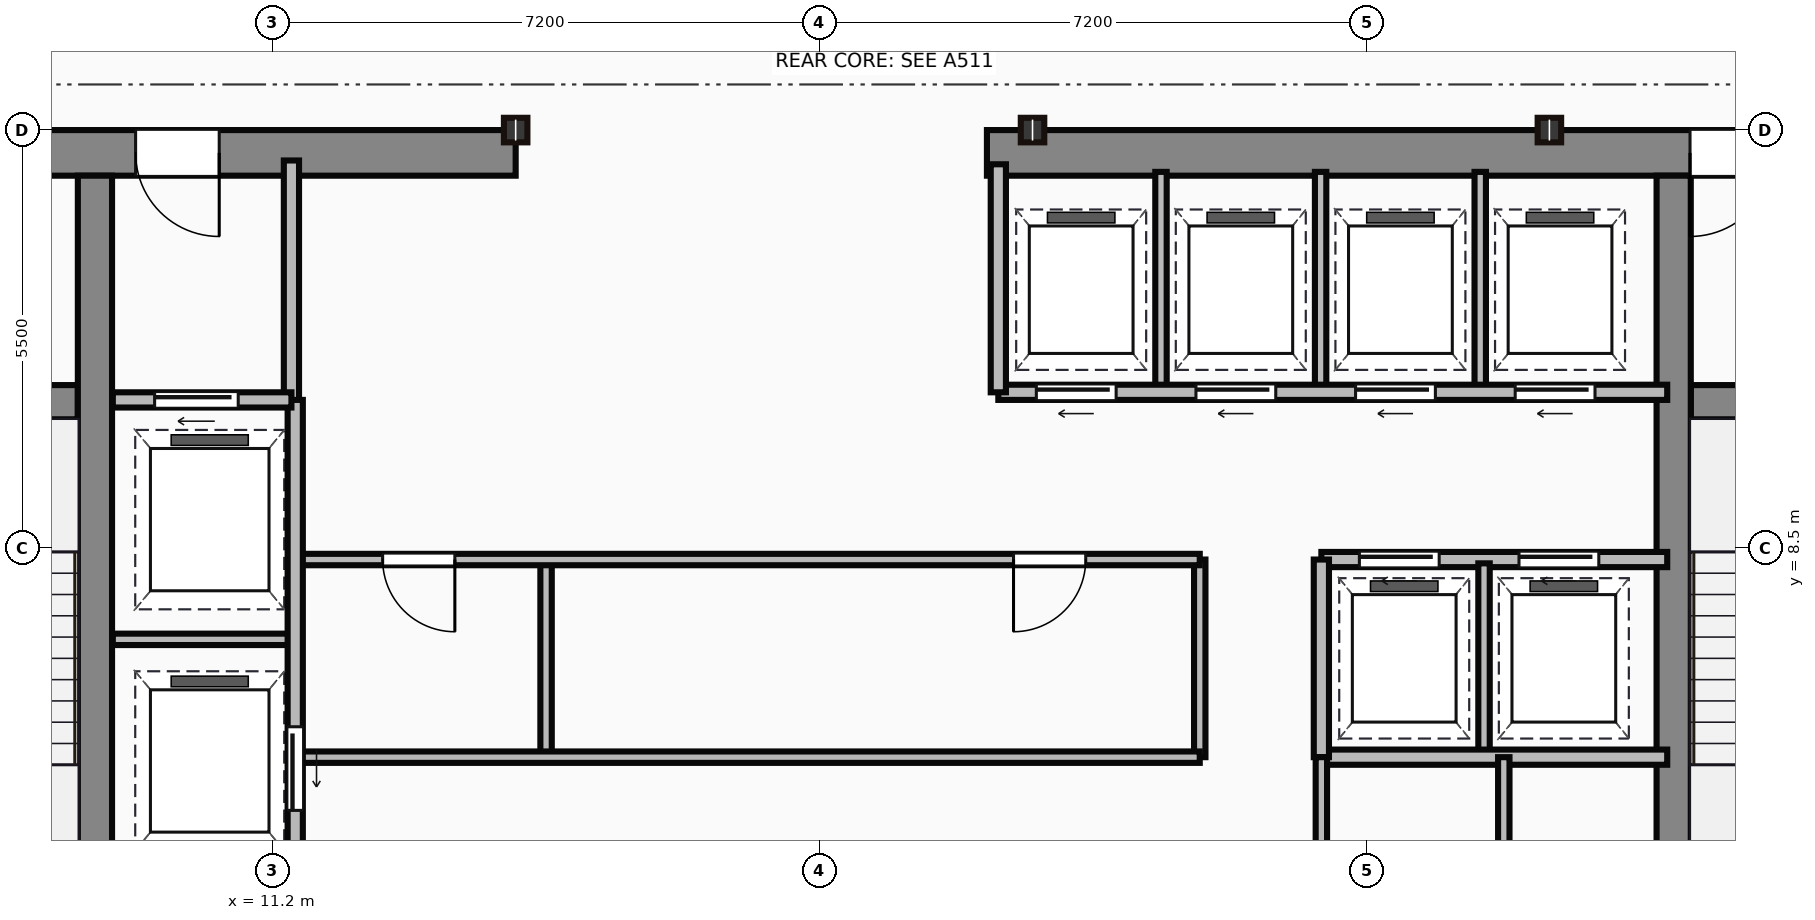
"""IFC4 building model, lengths in metres.
Left out: names, types, materials, properties, quantities, classifications, styles, units other than length and angle.
Written with IfcOpenShell. Run it as: python <this file> out.ifc"""

import sys

from ifc_helpers import new_model, si_unit, direction, frame, frame_2d, origin, origin_2d, place, context, subcontext, project, spatial, rectangle, i_section, extrude, source, transform, mapped, element, fill, save


model = new_model("IFC4")
c1 = context("Model", 3, precision=1e-05, world=origin(), true_north=direction((0.0, 1.0)))
c2 = subcontext(c1, "Body", "Model", "MODEL_VIEW")
j1 = project(units=[si_unit("LENGTHUNIT", "METRE"), si_unit("PLANEANGLEUNIT", "RADIAN")], contexts=[c1])
p1 = place(None, origin())
s1 = spatial("IfcSite", under=j1, at=p1, CompositionType="ELEMENT")
p2 = place(p1, origin())
s2 = spatial("IfcBuilding", under=s1, at=p2, CompositionType="ELEMENT")
p3 = place(p2, frame((0.0, 0.0, 255.15)))
s3 = spatial("IfcBuildingStorey", under=s2, at=p3, CompositionType="ELEMENT", Elevation=255.15)
m1 = source(origin(), c2, "Body", "SweptSolid", [
    extrude(rectangle(XDim=9.1, YDim=0.6, at=frame_2d((4.55, 0.0))), origin(), (0.0, 0.0, 1.0), 3.65),
])
p4 = place(p3, frame((5.3, 13.7, 0.0), z_axis=(0.0, 0.0, 1.0), x_axis=(1.0, 0.0, 0.0)))
e1 = element("IfcWall", 1, at=p4, inside=s3, PredefinedType="SHEAR", context=c2, shape_type="MappedRepresentation", body=[
    mapped(m1, transform((0.0, 0.0, 0.0))),
])
p5 = place(p4, frame((4.1, 0.0, 0.0)))
e2 = element("IfcOpeningElement", 2, at=p5, cuts=e1, PredefinedType="OPENING", context=c2, shape_type="SweptSolid", body=[
    extrude(rectangle(XDim=1.1, YDim=2.15, at=frame_2d((0.55, 1.075))), frame((0.0, 0.31, 0.0), z_axis=(0.0, -1.0, 0.0), x_axis=(1.0, 0.0, 0.0)), (0.0, 0.0, 1.0), 0.62),
])
m2 = source(origin(), c2, "Body", "SweptSolid", [
    extrude(rectangle(XDim=12.6, YDim=0.6, at=frame_2d((6.3, 0.0))), origin(), (0.0, 0.0, 1.0), 3.65),
])
p6 = place(p3, frame((20.6, 13.7, 0.0), z_axis=(0.0, 0.0, 1.0), x_axis=(1.0, 0.0, 0.0)))
e3 = element("IfcWall", 3, at=p6, inside=s3, PredefinedType="SHEAR", context=c2, shape_type="MappedRepresentation", body=[
    mapped(m2, transform((0.0, 0.0, 0.0))),
])
p7 = place(p6, frame((9.25, 0.0, 0.0)))
e4 = element("IfcOpeningElement", 4, at=p7, cuts=e3, PredefinedType="OPENING", context=c2, shape_type="SweptSolid", body=[
    extrude(rectangle(XDim=1.1, YDim=2.15, at=frame_2d((0.55, 1.075))), frame((0.0, 0.31, 0.0), z_axis=(0.0, -1.0, 0.0), x_axis=(1.0, 0.0, 0.0)), (0.0, 0.0, 1.0), 0.62),
])
m3 = source(origin(), c2, "Body", "SweptSolid", [
    extrude(rectangle(XDim=12.5, YDim=0.45, at=frame_2d((6.25, 0.0))), origin(), (0.0, 0.0, 1.0), 3.65),
])
for number, where, z_axis, x_axis in (
    (5, (8.865, 0.9, 0.0), (0.0, 0.0, 1.0), (0.0, 1.0, 0.0)),
    (6, (29.635, 0.9, 0.0), (0.0, 0.0, 1.0), (0.0, 1.0, 0.0)),
):
    element("IfcWall", number, at=place(p3, frame(where, z_axis=z_axis, x_axis=x_axis)), inside=s3, PredefinedType="SHEAR", context=c2, shape_type="MappedRepresentation", body=[
        mapped(m3, transform((0.0, 0.0, 0.0))),
    ])
m4 = source(origin(), c2, "Body", "SweptSolid", [
    extrude(rectangle(XDim=3.39, YDim=0.45, at=frame_2d((1.695, 0.0))), origin(), (0.0, 0.0, 1.0), 3.65),
])
p8 = place(p3, frame((5.25, 10.42, 0.0), z_axis=(0.0, 0.0, 1.0), x_axis=(1.0, 0.0, 0.0)))
e7 = element("IfcWall", 7, at=p8, inside=s3, PredefinedType="SHEAR", context=c2, shape_type="MappedRepresentation", body=[
    mapped(m4, transform((0.0, 0.0, 0.0))),
])
p9 = place(p8, frame((1.05, 0.0, 0.0)))
e8 = element("IfcOpeningElement", 8, at=p9, cuts=e7, PredefinedType="OPENING", context=c2, shape_type="SweptSolid", body=[
    extrude(rectangle(XDim=1.1, YDim=2.15, at=frame_2d((0.55, 1.075))), frame((0.0, 0.235, 0.0), z_axis=(0.0, -1.0, 0.0), x_axis=(1.0, 0.0, 0.0)), (0.0, 0.0, 1.0), 0.47),
])
p10 = place(p3, frame((29.86, 10.42, 0.0), z_axis=(0.0, 0.0, 1.0), x_axis=(1.0, 0.0, 0.0)))
e9 = element("IfcWall", 9, at=p10, inside=s3, PredefinedType="SHEAR", context=c2, shape_type="MappedRepresentation", body=[
    mapped(m4, transform((0.0, 0.0, 0.0))),
])
p11 = place(p10, frame((1.1, 0.0, 0.0)))
e10 = element("IfcOpeningElement", 10, at=p11, cuts=e9, PredefinedType="OPENING", context=c2, shape_type="SweptSolid", body=[
    extrude(rectangle(XDim=1.1, YDim=2.15, at=frame_2d((0.55, 1.075))), frame((0.0, 0.235, 0.0), z_axis=(0.0, -1.0, 0.0), x_axis=(1.0, 0.0, 0.0)), (0.0, 0.0, 1.0), 0.47),
])
m5 = source(origin(), c2, "Body", "SweptSolid", [
    extrude(i_section(OverallWidth=0.309, OverallDepth=0.323, WebThickness=0.014, FlangeThickness=0.023, at=origin_2d()), origin(), (0.0, 0.0, 1.0), 3.65),
])
for number, where, z_axis, x_axis in (
    (11, (14.4, 14.0, 0.0), (0.0, 0.0, 1.0), (1.0, 0.0, 0.0)),
    (12, (21.2, 14.0, 0.0), (0.0, 0.0, 1.0), (1.0, 0.0, 0.0)),
    (13, (28.0, 14.0, 0.0), (0.0, 0.0, 1.0), (1.0, 0.0, 0.0)),
):
    element("IfcColumn", number, at=place(p3, frame(where, z_axis=z_axis, x_axis=x_axis)), inside=s3, PredefinedType="COLUMN", context=c2, shape_type="MappedRepresentation", body=[
        mapped(m5, transform((0.0, 0.0, 0.0))),
    ])
m6 = source(origin(), c2, "Body", "SweptSolid", [
    extrude(rectangle(XDim=3.18, YDim=0.2, at=frame_2d((1.59, 0.0))), origin(), (0.0, 0.0, 1.0), 3.4),
])
p12 = place(p3, frame((11.45, 10.42, 0.0), z_axis=(0.0, 0.0, 1.0), x_axis=(0.0, 1.0, 0.0)))
e14 = element("IfcWall", 14, at=p12, inside=s3, PredefinedType="PARTITIONING", context=c2, shape_type="MappedRepresentation", body=[
    mapped(m6, transform((0.0, 0.0, 0.0))),
])
m7 = source(origin(), c2, "Body", "SweptSolid", [
    extrude(rectangle(XDim=2.35, YDim=0.2, at=frame_2d((1.175, 0.0))), origin(), (0.0, 0.0, 1.0), 3.4),
])
p13 = place(p3, frame((9.1, 10.45, 0.0), z_axis=(0.0, 0.0, 1.0), x_axis=(1.0, 0.0, 0.0)))
e15 = element("IfcWall", 15, at=p13, inside=s3, PredefinedType="PARTITIONING", context=c2, shape_type="MappedRepresentation", body=[
    mapped(m7, transform((0.0, 0.0, 0.0))),
])
p14 = place(p13, frame((0.55, 0.0, 0.0)))
e16 = element("IfcOpeningElement", 16, at=p14, cuts=e15, PredefinedType="OPENING", context=c2, shape_type="SweptSolid", body=[
    extrude(rectangle(XDim=1.1, YDim=2.15, at=frame_2d((0.55, 1.075))), frame((0.0, 0.11, 0.0), z_axis=(0.0, -1.0, 0.0), x_axis=(1.0, 0.0, 0.0)), (0.0, 0.0, 1.0), 0.22),
])
m8 = source(origin(), c2, "Body", "SweptSolid", [
    extrude(rectangle(XDim=9.6, YDim=0.2, at=frame_2d((4.8, 0.0))), origin(), (0.0, 0.0, 1.0), 3.4),
])
p15 = place(p3, frame((11.5, 0.85, 0.0), z_axis=(0.0, 0.0, 1.0), x_axis=(0.0, 1.0, 0.0)))
e17 = element("IfcWall", 17, at=p15, inside=s3, PredefinedType="PARTITIONING", context=c2, shape_type="MappedRepresentation", body=[
    mapped(m8, transform((0.0, 0.0, 0.0))),
])
p16 = place(p15, frame((4.2, 0.0, 0.0)))
e18 = element("IfcOpeningElement", 18, at=p16, cuts=e17, PredefinedType="OPENING", context=c2, shape_type="SweptSolid", body=[
    extrude(rectangle(XDim=1.1, YDim=2.15, at=frame_2d((0.55, 1.075))), frame((0.0, 0.11, 0.0), z_axis=(0.0, -1.0, 0.0), x_axis=(1.0, 0.0, 0.0)), (0.0, 0.0, 1.0), 0.22),
])
p17 = place(p15, frame((0.9, 0.0, 0.0)))
e19 = element("IfcOpeningElement", 19, at=p17, cuts=e17, PredefinedType="OPENING", context=c2, shape_type="SweptSolid", body=[
    extrude(rectangle(XDim=1.2, YDim=2.15, at=frame_2d((0.6, 1.075))), frame((0.0, 0.11, 0.0), z_axis=(0.0, -1.0, 0.0), x_axis=(1.0, 0.0, 0.0)), (0.0, 0.0, 1.0), 0.22),
])
m9 = source(origin(), c2, "Body", "SweptSolid", [
    extrude(rectangle(XDim=2.4, YDim=0.15, at=frame_2d((1.2, 0.0))), origin(), (0.0, 0.0, 1.0), 3.4),
])
p18 = place(p3, frame((9.1, 7.3, 0.0), z_axis=(0.0, 0.0, 1.0), x_axis=(1.0, 0.0, 0.0)))
e20 = element("IfcWall", 20, at=p18, inside=s3, PredefinedType="PARTITIONING", context=c2, shape_type="MappedRepresentation", body=[
    mapped(m9, transform((0.0, 0.0, 0.0))),
])
m10 = source(origin(), c2, "Body", "SweptSolid", [
    extrude(rectangle(XDim=11.85, YDim=0.15, at=frame_2d((5.925, 0.0))), origin(), (0.0, 0.0, 1.0), 3.4),
])
p19 = place(p3, frame((11.55, 5.75, 0.0), z_axis=(0.0, 0.0, 1.0), x_axis=(1.0, 0.0, 0.0)))
e21 = element("IfcWall", 21, at=p19, inside=s3, PredefinedType="PARTITIONING", context=c2, shape_type="MappedRepresentation", body=[
    mapped(m10, transform((0.0, 0.0, 0.0))),
])
p20 = place(p3, frame((11.55, 8.35, 0.0), z_axis=(0.0, 0.0, 1.0), x_axis=(1.0, 0.0, 0.0)))
e22 = element("IfcWall", 22, at=p20, inside=s3, PredefinedType="PARTITIONING", context=c2, shape_type="MappedRepresentation", body=[
    mapped(m10, transform((0.0, 0.0, 0.0))),
])
p21 = place(p20, frame((1.1, 0.0, 0.0)))
e23 = element("IfcOpeningElement", 23, at=p21, cuts=e22, PredefinedType="OPENING", context=c2, shape_type="SweptSolid", body=[
    extrude(rectangle(XDim=0.95, YDim=2.15, at=frame_2d((0.475, 1.075))), frame((0.0, 0.085, 0.0), z_axis=(0.0, -1.0, 0.0), x_axis=(1.0, 0.0, 0.0)), (0.0, 0.0, 1.0), 0.17),
])
p22 = place(p20, frame((9.4, 0.0, 0.0)))
e24 = element("IfcOpeningElement", 24, at=p22, cuts=e22, PredefinedType="OPENING", context=c2, shape_type="SweptSolid", body=[
    extrude(rectangle(XDim=0.95, YDim=2.15, at=frame_2d((0.475, 1.075))), frame((0.0, 0.085, 0.0), z_axis=(0.0, -1.0, 0.0), x_axis=(1.0, 0.0, 0.0)), (0.0, 0.0, 1.0), 0.17),
])
m11 = source(origin(), c2, "Body", "SweptSolid", [
    extrude(rectangle(XDim=2.6, YDim=0.15, at=frame_2d((1.3, 0.0))), origin(), (0.0, 0.0, 1.0), 3.4),
])
p23 = place(p3, frame((23.4, 5.75, 0.0), z_axis=(0.0, 0.0, 1.0), x_axis=(0.0, 1.0, 0.0)))
e25 = element("IfcWall", 25, at=p23, inside=s3, PredefinedType="PARTITIONING", context=c2, shape_type="MappedRepresentation", body=[
    mapped(m11, transform((0.0, 0.0, 0.0))),
])
m12 = source(origin(), c2, "Body", "SweptSolid", [
    extrude(rectangle(XDim=2.5, YDim=0.15, at=frame_2d((1.25, 0.0))), origin(), (0.0, 0.0, 1.0), 3.4),
])
p24 = place(p3, frame((14.8, 5.8, 0.0), z_axis=(0.0, 0.0, 1.0), x_axis=(0.0, 1.0, 0.0)))
e26 = element("IfcWall", 26, at=p24, inside=s3, PredefinedType="PARTITIONING", context=c2, shape_type="MappedRepresentation", body=[
    mapped(m12, transform((0.0, 0.0, 0.0))),
])
m13 = source(origin(), c2, "Body", "SweptSolid", [
    extrude(rectangle(XDim=8.8, YDim=0.2, at=frame_2d((4.4, 0.0))), origin(), (0.0, 0.0, 1.0), 3.4),
])
p25 = place(p3, frame((20.75, 10.55, 0.0), z_axis=(0.0, 0.0, 1.0), x_axis=(1.0, 0.0, 0.0)))
e27 = element("IfcWall", 27, at=p25, inside=s3, PredefinedType="PARTITIONING", context=c2, shape_type="MappedRepresentation", body=[
    mapped(m13, transform((0.0, 0.0, 0.0))),
])
p26 = place(p25, frame((0.5, 0.0, 0.0)))
e28 = element("IfcOpeningElement", 28, at=p26, cuts=e27, PredefinedType="OPENING", context=c2, shape_type="SweptSolid", body=[
    extrude(rectangle(XDim=1.05, YDim=2.15, at=frame_2d((0.525, 1.075))), frame((0.0, 0.11, 0.0), z_axis=(0.0, -1.0, 0.0), x_axis=(1.0, 0.0, 0.0)), (0.0, 0.0, 1.0), 0.22),
])
p27 = place(p25, frame((2.6, 0.0, 0.0)))
e29 = element("IfcOpeningElement", 29, at=p27, cuts=e27, PredefinedType="OPENING", context=c2, shape_type="SweptSolid", body=[
    extrude(rectangle(XDim=1.05, YDim=2.15, at=frame_2d((0.525, 1.075))), frame((0.0, 0.11, 0.0), z_axis=(0.0, -1.0, 0.0), x_axis=(1.0, 0.0, 0.0)), (0.0, 0.0, 1.0), 0.22),
])
p28 = place(p25, frame((4.7, 0.0, 0.0)))
e30 = element("IfcOpeningElement", 30, at=p28, cuts=e27, PredefinedType="OPENING", context=c2, shape_type="SweptSolid", body=[
    extrude(rectangle(XDim=1.05, YDim=2.15, at=frame_2d((0.525, 1.075))), frame((0.0, 0.11, 0.0), z_axis=(0.0, -1.0, 0.0), x_axis=(1.0, 0.0, 0.0)), (0.0, 0.0, 1.0), 0.22),
])
p29 = place(p25, frame((6.8, 0.0, 0.0)))
e31 = element("IfcOpeningElement", 31, at=p29, cuts=e27, PredefinedType="OPENING", context=c2, shape_type="SweptSolid", body=[
    extrude(rectangle(XDim=1.05, YDim=2.15, at=frame_2d((0.525, 1.075))), frame((0.0, 0.11, 0.0), z_axis=(0.0, -1.0, 0.0), x_axis=(1.0, 0.0, 0.0)), (0.0, 0.0, 1.0), 0.22),
])
m14 = source(origin(), c2, "Body", "SweptSolid", [
    extrude(rectangle(XDim=3.0, YDim=0.2, at=frame_2d((1.5, 0.0))), origin(), (0.0, 0.0, 1.0), 3.4),
])
p30 = place(p3, frame((20.75, 10.55, 0.0), z_axis=(0.0, 0.0, 1.0), x_axis=(0.0, 1.0, 0.0)))
e32 = element("IfcWall", 32, at=p30, inside=s3, PredefinedType="PARTITIONING", context=c2, shape_type="MappedRepresentation", body=[
    mapped(m14, transform((0.0, 0.0, 0.0))),
])
m15 = source(origin(), c2, "Body", "SweptSolid", [
    extrude(rectangle(XDim=2.85, YDim=0.15, at=frame_2d((1.425, 0.0))), origin(), (0.0, 0.0, 1.0), 3.4),
])
for number, where, z_axis, x_axis in (
    (33, (22.89, 10.6, 0.0), (0.0, 0.0, 1.0), (0.0, 1.0, 0.0)),
    (34, (24.99, 10.6, 0.0), (0.0, 0.0, 1.0), (0.0, 1.0, 0.0)),
    (35, (27.09, 10.6, 0.0), (0.0, 0.0, 1.0), (0.0, 1.0, 0.0)),
):
    element("IfcWall", number, at=place(p3, frame(where, z_axis=z_axis, x_axis=x_axis)), inside=s3, PredefinedType="PARTITIONING", context=c2, shape_type="MappedRepresentation", body=[
        mapped(m15, transform((0.0, 0.0, 0.0))),
    ])
m16 = source(origin(), c2, "Body", "SweptSolid", [
    extrude(rectangle(XDim=4.55, YDim=0.2, at=frame_2d((2.275, 0.0))), origin(), (0.0, 0.0, 1.0), 3.4),
])
p31 = place(p3, frame((25.0, 8.35, 0.0), z_axis=(0.0, 0.0, 1.0), x_axis=(1.0, 0.0, 0.0)))
e36 = element("IfcWall", 36, at=p31, inside=s3, PredefinedType="PARTITIONING", context=c2, shape_type="MappedRepresentation", body=[
    mapped(m16, transform((0.0, 0.0, 0.0))),
])
p32 = place(p31, frame((0.5, 0.0, 0.0)))
e37 = element("IfcOpeningElement", 37, at=p32, cuts=e36, PredefinedType="OPENING", context=c2, shape_type="SweptSolid", body=[
    extrude(rectangle(XDim=1.05, YDim=2.15, at=frame_2d((0.525, 1.075))), frame((0.0, 0.11, 0.0), z_axis=(0.0, -1.0, 0.0), x_axis=(1.0, 0.0, 0.0)), (0.0, 0.0, 1.0), 0.22),
])
p33 = place(p31, frame((2.6, 0.0, 0.0)))
e38 = element("IfcOpeningElement", 38, at=p33, cuts=e36, PredefinedType="OPENING", context=c2, shape_type="SweptSolid", body=[
    extrude(rectangle(XDim=1.05, YDim=2.15, at=frame_2d((0.525, 1.075))), frame((0.0, 0.11, 0.0), z_axis=(0.0, -1.0, 0.0), x_axis=(1.0, 0.0, 0.0)), (0.0, 0.0, 1.0), 0.22),
])
p34 = place(p3, frame((25.0, 5.75, 0.0), z_axis=(0.0, 0.0, 1.0), x_axis=(1.0, 0.0, 0.0)))
e39 = element("IfcWall", 39, at=p34, inside=s3, PredefinedType="PARTITIONING", context=c2, shape_type="MappedRepresentation", body=[
    mapped(m16, transform((0.0, 0.0, 0.0))),
])
m17 = source(origin(), c2, "Body", "SweptSolid", [
    extrude(rectangle(XDim=2.6, YDim=0.2, at=frame_2d((1.3, 0.0))), origin(), (0.0, 0.0, 1.0), 3.4),
])
p35 = place(p3, frame((25.0, 5.75, 0.0), z_axis=(0.0, 0.0, 1.0), x_axis=(0.0, 1.0, 0.0)))
e40 = element("IfcWall", 40, at=p35, inside=s3, PredefinedType="PARTITIONING", context=c2, shape_type="MappedRepresentation", body=[
    mapped(m17, transform((0.0, 0.0, 0.0))),
])
p36 = place(p3, frame((27.14, 5.8, 0.0), z_axis=(0.0, 0.0, 1.0), x_axis=(0.0, 1.0, 0.0)))
e41 = element("IfcWall", 41, at=p36, inside=s3, PredefinedType="PARTITIONING", context=c2, shape_type="MappedRepresentation", body=[
    mapped(m12, transform((0.0, 0.0, 0.0))),
])
m18 = source(origin(), c2, "Body", "SweptSolid", [
    extrude(rectangle(XDim=4.9, YDim=0.15, at=frame_2d((2.45, 0.0))), origin(), (0.0, 0.0, 1.0), 3.4),
])
p37 = place(p3, frame((25.0, 0.85, 0.0), z_axis=(0.0, 0.0, 1.0), x_axis=(0.0, 1.0, 0.0)))
e42 = element("IfcWall", 42, at=p37, inside=s3, PredefinedType="PARTITIONING", context=c2, shape_type="MappedRepresentation", body=[
    mapped(m18, transform((0.0, 0.0, 0.0))),
])
p38 = place(p37, frame((2.5, 0.0, 0.0)))
e43 = element("IfcOpeningElement", 43, at=p38, cuts=e42, PredefinedType="OPENING", context=c2, shape_type="SweptSolid", body=[
    extrude(rectangle(XDim=0.95, YDim=2.15, at=frame_2d((0.475, 1.075))), frame((0.0, 0.085, 0.0), z_axis=(0.0, -1.0, 0.0), x_axis=(1.0, 0.0, 0.0)), (0.0, 0.0, 1.0), 0.17),
])
m19 = source(origin(), c2, "Body", "SweptSolid", [
    extrude(rectangle(XDim=3.4, YDim=0.15, at=frame_2d((1.7, 0.0))), origin(), (0.0, 0.0, 1.0), 3.4),
])
p39 = place(p3, frame((27.4, 2.35, 0.0), z_axis=(0.0, 0.0, 1.0), x_axis=(0.0, 1.0, 0.0)))
e44 = element("IfcWall", 44, at=p39, inside=s3, PredefinedType="PARTITIONING", context=c2, shape_type="MappedRepresentation", body=[
    mapped(m19, transform((0.0, 0.0, 0.0))),
])
p40 = place(p39, frame((1.1, 0.0, 0.0)))
e45 = element("IfcOpeningElement", 45, at=p40, cuts=e44, PredefinedType="OPENING", context=c2, shape_type="SweptSolid", body=[
    extrude(rectangle(XDim=0.85, YDim=2.1, at=frame_2d((0.425, 1.05))), frame((0.0, 0.085, 0.0), z_axis=(0.0, -1.0, 0.0), x_axis=(1.0, 0.0, 0.0)), (0.0, 0.0, 1.0), 0.17),
])
m20 = source(origin(), c2, "Body", "SweptSolid", [
    extrude(rectangle(XDim=1.1, YDim=2.15, at=frame_2d((0.55, 1.075))), frame((0.0, 0.025, 0.0), z_axis=(0.0, -1.0, 0.0), x_axis=(1.0, 0.0, 0.0)), (0.0, 0.0, 1.0), 0.05),
])
p41 = place(p5, origin())
e46 = element("IfcDoor", 46, at=p41, inside=s3, OperationType="SINGLE_SWING_RIGHT", PredefinedType="DOOR", context=c2, shape_type="MappedRepresentation", body=[
    mapped(m20, transform((0.0, 0.0, 0.0))),
])
fill(e2, e46)
p42 = place(p7, origin())
e47 = element("IfcDoor", 47, at=p42, inside=s3, OperationType="SINGLE_SWING_LEFT", PredefinedType="DOOR", context=c2, shape_type="MappedRepresentation", body=[
    mapped(m20, transform((0.0, 0.0, 0.0))),
])
fill(e4, e47)
p43 = place(p14, origin())
e48 = element("IfcDoor", 48, at=p43, inside=s3, OperationType="SLIDING_TO_LEFT", PredefinedType="DOOR", context=c2, shape_type="MappedRepresentation", body=[
    mapped(m20, transform((0.0, 0.0, 0.0))),
])
fill(e16, e48)
p44 = place(p16, frame((1.1, 0.0, 0.0), z_axis=(0.0, 0.0, 1.0), x_axis=(-1.0, 0.0, 0.0)))
e49 = element("IfcDoor", 49, at=p44, inside=s3, OperationType="SLIDING_TO_LEFT", PredefinedType="DOOR", context=c2, shape_type="MappedRepresentation", body=[
    mapped(m20, transform((0.0, 0.0, 0.0))),
])
fill(e18, e49)
m21 = source(origin(), c2, "Body", "SweptSolid", [
    extrude(rectangle(XDim=0.95, YDim=2.15, at=frame_2d((0.475, 1.075))), frame((0.0, 0.025, 0.0), z_axis=(0.0, -1.0, 0.0), x_axis=(1.0, 0.0, 0.0)), (0.0, 0.0, 1.0), 0.05),
])
p45 = place(p21, origin())
e50 = element("IfcDoor", 50, at=p45, inside=s3, OperationType="SINGLE_SWING_RIGHT", PredefinedType="DOOR", context=c2, shape_type="MappedRepresentation", body=[
    mapped(m21, transform((0.0, 0.0, 0.0))),
])
fill(e23, e50)
p46 = place(p22, origin())
e51 = element("IfcDoor", 51, at=p46, inside=s3, OperationType="SINGLE_SWING_LEFT", PredefinedType="DOOR", context=c2, shape_type="MappedRepresentation", body=[
    mapped(m21, transform((0.0, 0.0, 0.0))),
])
fill(e24, e51)
m22 = source(origin(), c2, "Body", "SweptSolid", [
    extrude(rectangle(XDim=1.05, YDim=2.15, at=frame_2d((0.525, 1.075))), frame((0.0, 0.025, 0.0), z_axis=(0.0, -1.0, 0.0), x_axis=(1.0, 0.0, 0.0)), (0.0, 0.0, 1.0), 0.05),
])
p47 = place(p26, frame((1.05, 0.0, 0.0), z_axis=(0.0, 0.0, 1.0), x_axis=(-1.0, 0.0, 0.0)))
e52 = element("IfcDoor", 52, at=p47, inside=s3, OperationType="SLIDING_TO_LEFT", PredefinedType="DOOR", context=c2, shape_type="MappedRepresentation", body=[
    mapped(m22, transform((0.0, 0.0, 0.0))),
])
fill(e28, e52)
p48 = place(p27, frame((1.05, 0.0, 0.0), z_axis=(0.0, 0.0, 1.0), x_axis=(-1.0, 0.0, 0.0)))
e53 = element("IfcDoor", 53, at=p48, inside=s3, OperationType="SLIDING_TO_LEFT", PredefinedType="DOOR", context=c2, shape_type="MappedRepresentation", body=[
    mapped(m22, transform((0.0, 0.0, 0.0))),
])
fill(e29, e53)
p49 = place(p28, frame((1.05, 0.0, 0.0), z_axis=(0.0, 0.0, 1.0), x_axis=(-1.0, 0.0, 0.0)))
e54 = element("IfcDoor", 54, at=p49, inside=s3, OperationType="SLIDING_TO_LEFT", PredefinedType="DOOR", context=c2, shape_type="MappedRepresentation", body=[
    mapped(m22, transform((0.0, 0.0, 0.0))),
])
fill(e30, e54)
p50 = place(p29, frame((1.05, 0.0, 0.0), z_axis=(0.0, 0.0, 1.0), x_axis=(-1.0, 0.0, 0.0)))
e55 = element("IfcDoor", 55, at=p50, inside=s3, OperationType="SLIDING_TO_LEFT", PredefinedType="DOOR", context=c2, shape_type="MappedRepresentation", body=[
    mapped(m22, transform((0.0, 0.0, 0.0))),
])
fill(e31, e55)
p51 = place(p32, origin())
e56 = element("IfcDoor", 56, at=p51, inside=s3, OperationType="SLIDING_TO_LEFT", PredefinedType="DOOR", context=c2, shape_type="MappedRepresentation", body=[
    mapped(m22, transform((0.0, 0.0, 0.0))),
])
fill(e37, e56)
p52 = place(p33, origin())
e57 = element("IfcDoor", 57, at=p52, inside=s3, OperationType="SLIDING_TO_LEFT", PredefinedType="DOOR", context=c2, shape_type="MappedRepresentation", body=[
    mapped(m22, transform((0.0, 0.0, 0.0))),
])
fill(e38, e57)
save(model, sys.argv[1])
